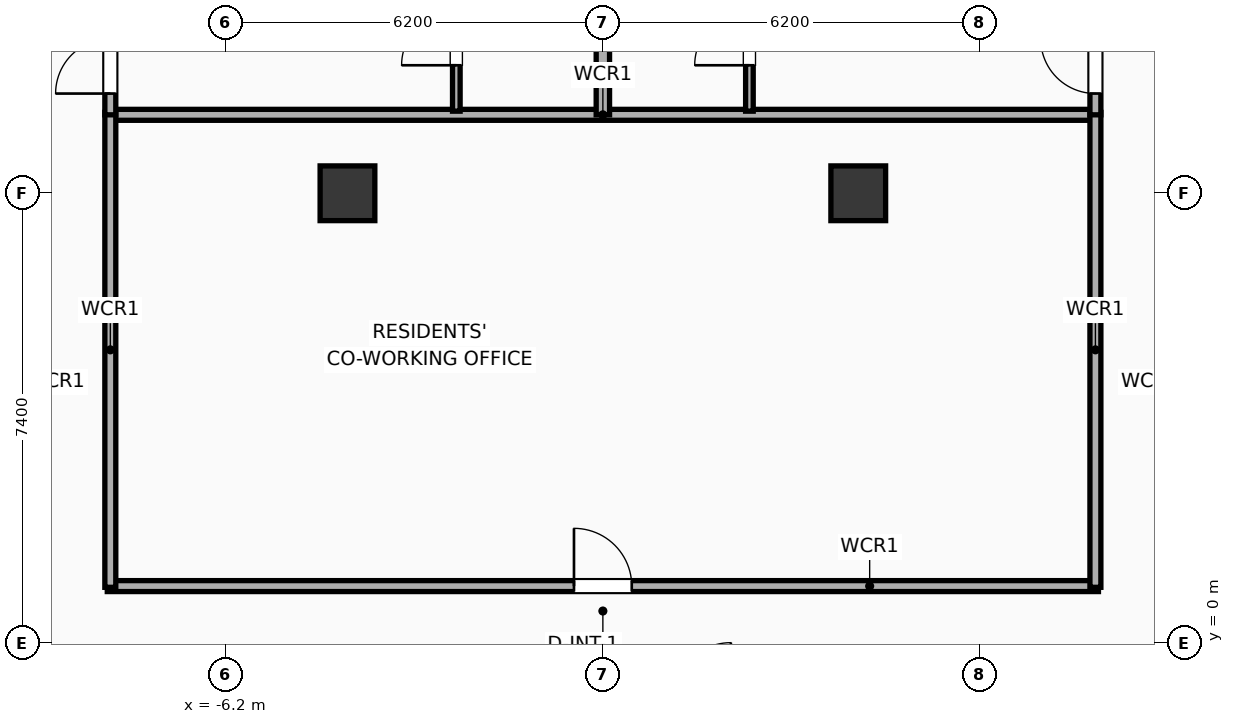
"""IFC4 building model, lengths in metres.
Left out: names, types, materials, properties, quantities, classifications, styles, units other than length and angle.
Written with IfcOpenShell. Run it as: python <this file> out.ifc"""

import sys

from ifc_helpers import new_model, si_unit, direction, frame, frame_2d, origin, origin_2d, place, context, subcontext, project, spatial, rectangle, extrude, element, fill, save


model = new_model("IFC4")
c1 = context("Model", 3, precision=1e-05, world=origin(), true_north=direction((0.0, 1.0)))
c2 = subcontext(c1, "Body", "Model", "MODEL_VIEW")
j1 = project(units=[si_unit("LENGTHUNIT", "METRE"), si_unit("PLANEANGLEUNIT", "RADIAN")], contexts=[c1])
p1 = place(None, origin())
s1 = spatial("IfcSite", under=j1, at=p1, CompositionType="ELEMENT")
p2 = place(p1, origin())
s2 = spatial("IfcBuilding", under=s1, at=p2, CompositionType="ELEMENT")
p3 = place(p2, frame((0.0, 0.0, 187.2)))
s3 = spatial("IfcBuildingStorey", under=s2, at=p3, CompositionType="ELEMENT", Elevation=187.2)
for number, where, z_axis, x_axis in (
    (1, (-4.2, 7.4, 0.0), (0.0, 0.0, 1.0), (1.0, 0.0, 0.0)),
    (2, (4.2, 7.4, 0.0), (0.0, 0.0, 1.0), (1.0, 0.0, 0.0)),
):
    element("IfcColumn", number, at=place(p3, frame(where, z_axis=z_axis, x_axis=x_axis)), inside=s3, PredefinedType="COLUMN", context=c2, shape_type="SweptSolid", body=[
        extrude(rectangle(XDim=0.9, YDim=0.9, at=origin_2d()), origin(), (0.0, 0.0, 1.0), 3.9),
    ])
p4 = place(p3, frame((-8.15, 8.69, 0.0), z_axis=(0.0, 0.0, 1.0), x_axis=(1.0, 0.0, 0.0)))
e3 = element("IfcWall", 3, at=p4, inside=s3, PredefinedType="PARTITIONING", context=c2, shape_type="SweptSolid", body=[
    extrude(rectangle(XDim=16.3, YDim=0.18, at=frame_2d((8.15, 0.0))), origin(), (0.0, 0.0, 1.0), 3.65),
])
p5 = place(p3, frame((-8.15, 0.94, 0.0), z_axis=(0.0, 0.0, 1.0), x_axis=(1.0, 0.0, 0.0)))
e4 = element("IfcWall", 4, at=p5, inside=s3, PredefinedType="PARTITIONING", context=c2, shape_type="SweptSolid", body=[
    extrude(rectangle(XDim=16.3, YDim=0.18, at=frame_2d((8.15, 0.0))), origin(), (0.0, 0.0, 1.0), 3.65),
])
p6 = place(p5, frame((7.675, 0.0, 0.0)))
e5 = element("IfcOpeningElement", 5, at=p6, cuts=e4, PredefinedType="OPENING", context=c2, shape_type="SweptSolid", body=[
    extrude(rectangle(XDim=0.95, YDim=2.05, at=frame_2d((0.475, 1.025))), frame((0.0, 0.1, 0.0), z_axis=(0.0, -1.0, 0.0), x_axis=(1.0, 0.0, 0.0)), (0.0, 0.0, 1.0), 0.2),
])
for number, where, z_axis, x_axis in (
    (6, (-8.1, 0.92, 0.0), (0.0, 0.0, 1.0), (0.0, 1.0, 0.0)),
    (7, (8.1, 0.92, 0.0), (0.0, 0.0, 1.0), (0.0, 1.0, 0.0)),
):
    element("IfcWall", number, at=place(p3, frame(where, z_axis=z_axis, x_axis=x_axis)), inside=s3, PredefinedType="PARTITIONING", context=c2, shape_type="SweptSolid", body=[
        extrude(rectangle(XDim=7.81, YDim=0.18, at=frame_2d((3.905, 0.0))), origin(), (0.0, 0.0, 1.0), 3.65),
    ])
p7 = place(p3, frame((-2.41, 8.75, 0.0), z_axis=(0.0, 0.0, 1.0), x_axis=(0.0, 1.0, 0.0)))
e8 = element("IfcWall", 8, at=p7, inside=s3, PredefinedType="PARTITIONING", context=c2, shape_type="SweptSolid", body=[
    extrude(rectangle(XDim=2.41, YDim=0.125, at=frame_2d((1.205, 0.0))), origin(), (0.0, 0.0, 1.0), 3.65),
])
p8 = place(p7, frame((0.755, 0.0, 0.0)))
e9 = element("IfcOpeningElement", 9, at=p8, cuts=e8, PredefinedType="OPENING", context=c2, shape_type="SweptSolid", body=[
    extrude(rectangle(XDim=0.9, YDim=2.05, at=frame_2d((0.45, 1.025))), frame((0.0, 0.073, 0.0), z_axis=(0.0, -1.0, 0.0), x_axis=(1.0, 0.0, 0.0)), (0.0, 0.0, 1.0), 0.145),
])
p9 = place(p3, frame((-8.1, 8.69, 0.0), z_axis=(0.0, 0.0, 1.0), x_axis=(0.0, 1.0, 0.0)))
e10 = element("IfcWall", 10, at=p9, inside=s3, PredefinedType="PARTITIONING", context=c2, shape_type="SweptSolid", body=[
    extrude(rectangle(XDim=10.536, YDim=0.18, at=frame_2d((5.268, 0.0))), origin(), (0.0, 0.0, 1.0), 3.65),
])
p10 = place(p9, frame((0.35, 0.0, 0.0)))
e11 = element("IfcOpeningElement", 11, at=p10, cuts=e10, PredefinedType="OPENING", context=c2, shape_type="SweptSolid", body=[
    extrude(rectangle(XDim=0.9, YDim=2.05, at=frame_2d((0.45, 1.025))), frame((0.0, 0.1, 0.0), z_axis=(0.0, -1.0, 0.0), x_axis=(1.0, 0.0, 0.0)), (0.0, 0.0, 1.0), 0.2),
])
p11 = place(p3, frame((2.41, 8.75, 0.0), z_axis=(0.0, 0.0, 1.0), x_axis=(0.0, 1.0, 0.0)))
e12 = element("IfcWall", 12, at=p11, inside=s3, PredefinedType="PARTITIONING", context=c2, shape_type="SweptSolid", body=[
    extrude(rectangle(XDim=2.41, YDim=0.125, at=frame_2d((1.205, 0.0))), origin(), (0.0, 0.0, 1.0), 3.65),
])
p12 = place(p11, frame((0.755, 0.0, 0.0)))
e13 = element("IfcOpeningElement", 13, at=p12, cuts=e12, PredefinedType="OPENING", context=c2, shape_type="SweptSolid", body=[
    extrude(rectangle(XDim=0.9, YDim=2.05, at=frame_2d((0.45, 1.025))), frame((0.0, 0.073, 0.0), z_axis=(0.0, -1.0, 0.0), x_axis=(1.0, 0.0, 0.0)), (0.0, 0.0, 1.0), 0.145),
])
p13 = place(p3, frame((8.1, 8.69, 0.0), z_axis=(0.0, 0.0, 1.0), x_axis=(0.0, 1.0, 0.0)))
e14 = element("IfcWall", 14, at=p13, inside=s3, PredefinedType="PARTITIONING", context=c2, shape_type="SweptSolid", body=[
    extrude(rectangle(XDim=12.239, YDim=0.18, at=frame_2d((6.12, 0.0))), origin(), (0.0, 0.0, 1.0), 3.65),
])
p14 = place(p13, frame((0.35, 0.0, 0.0)))
e15 = element("IfcOpeningElement", 15, at=p14, cuts=e14, PredefinedType="OPENING", context=c2, shape_type="SweptSolid", body=[
    extrude(rectangle(XDim=0.9, YDim=2.05, at=frame_2d((0.45, 1.025))), frame((0.0, 0.1, 0.0), z_axis=(0.0, -1.0, 0.0), x_axis=(1.0, 0.0, 0.0)), (0.0, 0.0, 1.0), 0.2),
])
p15 = place(p3, frame((0.0, 8.69, 0.0), z_axis=(0.0, 0.0, 1.0), x_axis=(0.0, 1.0, 0.0)))
e16 = element("IfcWall", 16, at=p15, inside=s3, PredefinedType="PARTITIONING", context=c2, shape_type="SweptSolid", body=[
    extrude(rectangle(XDim=11.388, YDim=0.22, at=frame_2d((5.694, 0.0))), origin(), (0.0, 0.0, 1.0), 3.04),
])
p16 = place(p6, origin())
e17 = element("IfcDoor", 17, at=p16, inside=s3, OperationType="SINGLE_SWING_LEFT", PredefinedType="DOOR", context=c2, shape_type="SweptSolid", body=[
    extrude(rectangle(XDim=0.95, YDim=2.05, at=frame_2d((0.475, 1.025))), frame((0.0, 0.025, 0.0), z_axis=(0.0, -1.0, 0.0), x_axis=(1.0, 0.0, 0.0)), (0.0, 0.0, 1.0), 0.05),
])
fill(e5, e17)
p17 = place(p8, origin())
e18 = element("IfcDoor", 18, at=p17, inside=s3, OperationType="SINGLE_SWING_LEFT", PredefinedType="DOOR", context=c2, shape_type="SweptSolid", body=[
    extrude(rectangle(XDim=0.9, YDim=2.05, at=frame_2d((0.45, 1.025))), frame((0.0, 0.025, 0.0), z_axis=(0.0, -1.0, 0.0), x_axis=(1.0, 0.0, 0.0)), (0.0, 0.0, 1.0), 0.05),
])
fill(e9, e18)
p18 = place(p10, origin())
e19 = element("IfcDoor", 19, at=p18, inside=s3, OperationType="SINGLE_SWING_LEFT", PredefinedType="DOOR", context=c2, shape_type="SweptSolid", body=[
    extrude(rectangle(XDim=0.9, YDim=2.05, at=frame_2d((0.45, 1.025))), frame((0.0, 0.025, 0.0), z_axis=(0.0, -1.0, 0.0), x_axis=(1.0, 0.0, 0.0)), (0.0, 0.0, 1.0), 0.05),
])
fill(e11, e19)
p19 = place(p12, origin())
e20 = element("IfcDoor", 20, at=p19, inside=s3, OperationType="SINGLE_SWING_LEFT", PredefinedType="DOOR", context=c2, shape_type="SweptSolid", body=[
    extrude(rectangle(XDim=0.9, YDim=2.05, at=frame_2d((0.45, 1.025))), frame((0.0, 0.025, 0.0), z_axis=(0.0, -1.0, 0.0), x_axis=(1.0, 0.0, 0.0)), (0.0, 0.0, 1.0), 0.05),
])
fill(e13, e20)
p20 = place(p14, origin())
e21 = element("IfcDoor", 21, at=p20, inside=s3, OperationType="SINGLE_SWING_RIGHT", PredefinedType="DOOR", context=c2, shape_type="SweptSolid", body=[
    extrude(rectangle(XDim=0.9, YDim=2.05, at=frame_2d((0.45, 1.025))), frame((0.0, 0.025, 0.0), z_axis=(0.0, -1.0, 0.0), x_axis=(1.0, 0.0, 0.0)), (0.0, 0.0, 1.0), 0.05),
])
fill(e15, e21)
save(model, sys.argv[1])
